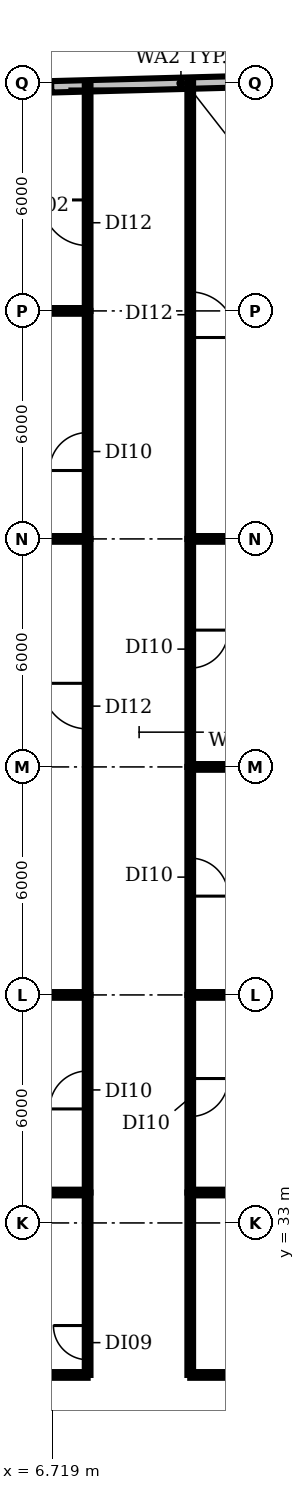
"""IFC4 building model, lengths in metres.
Left out: names, types, materials, properties, quantities, classifications, styles, units other than length and angle.
Written with IfcOpenShell. Run it as: python <this file> out.ifc"""

import sys

from ifc_helpers import new_model, si_unit, direction, frame, frame_2d, origin, place, context, subcontext, project, spatial, rectangle, extrude, element, fill, save


model = new_model("IFC4")
c1 = context("Model", 3, precision=1e-05, world=origin(), true_north=direction((0.0, 1.0)))
c2 = subcontext(c1, "Body", "Model", "MODEL_VIEW")
j1 = project(units=[si_unit("LENGTHUNIT", "METRE"), si_unit("PLANEANGLEUNIT", "RADIAN")], contexts=[c1])
p1 = place(None, origin())
s1 = spatial("IfcSite", under=j1, at=p1, CompositionType="ELEMENT")
p2 = place(p1, origin())
s2 = spatial("IfcBuilding", under=s1, at=p2, CompositionType="ELEMENT")
p3 = place(p2, frame((0.0, 0.0, 293.6)))
s3 = spatial("IfcBuildingStorey", under=s2, at=p3, CompositionType="ELEMENT", Elevation=293.6)
p4 = place(p3, frame((13.518, 63.08, 0.0), z_axis=(0.0, 0.0, 1.0), x_axis=(-0.999640403912, -0.026815347578, 0.0)))
e1 = element("IfcWall", 1, at=p4, inside=s3, PredefinedType="SOLIDWALL", context=c2, shape_type="SweptSolid", body=[
    extrude(rectangle(XDim=6.828, YDim=0.3, at=frame_2d((3.414, 0.0))), origin(), (0.0, 0.0, 1.0), 3.85),
])
p5 = place(p3, frame((-1.716, 57.0, 0.0), z_axis=(0.0, 0.0, 1.0), x_axis=(1.0, 0.0, 0.0)))
e2 = element("IfcWall", 2, at=p5, inside=s3, PredefinedType="PARTITIONING", context=c2, shape_type="SweptSolid", body=[
    extrude(rectangle(XDim=9.366, YDim=0.15, at=frame_2d((4.683, 0.0))), origin(), (0.0, 0.0, 1.0), 2.9),
])
p6 = place(p3, frame((-1.566, 51.0, 0.0), z_axis=(0.0, 0.0, 1.0), x_axis=(1.0, 0.0, 0.0)))
e3 = element("IfcWall", 3, at=p6, inside=s3, PredefinedType="PARTITIONING", context=c2, shape_type="SweptSolid", body=[
    extrude(rectangle(XDim=9.216, YDim=0.15, at=frame_2d((4.608, 0.0))), origin(), (0.0, 0.0, 1.0), 2.9),
])
p7 = place(p3, frame((-1.26, 39.0, 0.0), z_axis=(0.0, 0.0, 1.0), x_axis=(1.0, 0.0, 0.0)))
e4 = element("IfcWall", 4, at=p7, inside=s3, PredefinedType="PARTITIONING", context=c2, shape_type="SweptSolid", body=[
    extrude(rectangle(XDim=8.91, YDim=0.15, at=frame_2d((4.455, 0.0))), origin(), (0.0, 0.0, 1.0), 2.9),
])
p8 = place(p3, frame((-1.115, 33.8, 0.0), z_axis=(0.0, 0.0, 1.0), x_axis=(1.0, 0.0, 0.0)))
e5 = element("IfcWall", 5, at=p8, inside=s3, PredefinedType="PARTITIONING", context=c2, shape_type="SweptSolid", body=[
    extrude(rectangle(XDim=8.765, YDim=0.15, at=frame_2d((4.383, 0.0))), origin(), (0.0, 0.0, 1.0), 2.9),
])
p9 = place(p3, frame((3.0, 29.0, 0.0), z_axis=(0.0, 0.0, 1.0), x_axis=(1.0, 0.0, 0.0)))
e6 = element("IfcWall", 6, at=p9, inside=s3, PredefinedType="PARTITIONING", context=c2, shape_type="SweptSolid", body=[
    extrude(rectangle(XDim=4.65, YDim=0.15, at=frame_2d((2.325, 0.0))), origin(), (0.0, 0.0, 1.0), 2.9),
])
p10 = place(p3, frame((7.65, 29.0, 0.0), z_axis=(0.0, 0.0, 1.0), x_axis=(0.0, 1.0, 0.0)))
e7 = element("IfcWall", 7, at=p10, inside=s3, PredefinedType="PARTITIONING", context=c2, shape_type="SweptSolid", body=[
    extrude(rectangle(XDim=4.8, YDim=0.15, at=frame_2d((2.4, 0.0))), origin(), (0.0, 0.0, 1.0), 2.9),
])
p11 = place(p10, frame((0.4, 0.0, 0.0)))
e8 = element("IfcOpeningElement", 8, at=p11, cuts=e7, PredefinedType="OPENING", context=c2, shape_type="SweptSolid", body=[
    extrude(rectangle(XDim=0.9, YDim=2.1, at=frame_2d((0.45, 1.05))), frame((0.0, 0.085, 0.0), z_axis=(0.0, -1.0, 0.0), x_axis=(1.0, 0.0, 0.0)), (0.0, 0.0, 1.0), 0.17),
])
p12 = place(p3, frame((7.65, 33.8, 0.0), z_axis=(0.0, 0.0, 1.0), x_axis=(0.0, 1.0, 0.0)))
e9 = element("IfcWall", 9, at=p12, inside=s3, PredefinedType="PARTITIONING", context=c2, shape_type="SweptSolid", body=[
    extrude(rectangle(XDim=5.2, YDim=0.15, at=frame_2d((2.6, 0.0))), origin(), (0.0, 0.0, 1.0), 2.9),
])
p13 = place(p12, frame((2.2, 0.0, 0.0)))
e10 = element("IfcOpeningElement", 10, at=p13, cuts=e9, PredefinedType="OPENING", context=c2, shape_type="SweptSolid", body=[
    extrude(rectangle(XDim=1.0, YDim=2.1, at=frame_2d((0.5, 1.05))), frame((0.0, 0.085, 0.0), z_axis=(0.0, -1.0, 0.0), x_axis=(1.0, 0.0, 0.0)), (0.0, 0.0, 1.0), 0.17),
])
p14 = place(p3, frame((7.65, 39.0, 0.0), z_axis=(0.0, 0.0, 1.0), x_axis=(0.0, 1.0, 0.0)))
e11 = element("IfcWall", 11, at=p14, inside=s3, PredefinedType="PARTITIONING", context=c2, shape_type="SweptSolid", body=[
    extrude(rectangle(XDim=12.0, YDim=0.15, at=frame_2d((6.0, 0.0))), origin(), (0.0, 0.0, 1.0), 2.9),
])
p15 = place(p14, frame((7.0, 0.0, 0.0)))
e12 = element("IfcOpeningElement", 12, at=p15, cuts=e11, PredefinedType="OPENING", context=c2, shape_type="SweptSolid", body=[
    extrude(rectangle(XDim=1.2, YDim=2.1, at=frame_2d((0.6, 1.05))), frame((0.0, 0.085, 0.0), z_axis=(0.0, -1.0, 0.0), x_axis=(1.0, 0.0, 0.0)), (0.0, 0.0, 1.0), 0.17),
])
p16 = place(p3, frame((7.65, 51.0, 0.0), z_axis=(0.0, 0.0, 1.0), x_axis=(0.0, 1.0, 0.0)))
e13 = element("IfcWall", 13, at=p16, inside=s3, PredefinedType="PARTITIONING", context=c2, shape_type="SweptSolid", body=[
    extrude(rectangle(XDim=6.0, YDim=0.15, at=frame_2d((3.0, 0.0))), origin(), (0.0, 0.0, 1.0), 2.9),
])
p17 = place(p16, frame((1.8, 0.0, 0.0)))
e14 = element("IfcOpeningElement", 14, at=p17, cuts=e13, PredefinedType="OPENING", context=c2, shape_type="SweptSolid", body=[
    extrude(rectangle(XDim=1.0, YDim=2.1, at=frame_2d((0.5, 1.05))), frame((0.0, 0.085, 0.0), z_axis=(0.0, -1.0, 0.0), x_axis=(1.0, 0.0, 0.0)), (0.0, 0.0, 1.0), 0.17),
])
p18 = place(p3, frame((7.65, 57.0, 0.0), z_axis=(0.0, 0.0, 1.0), x_axis=(0.0, 1.0, 0.0)))
e15 = element("IfcWall", 15, at=p18, inside=s3, PredefinedType="PARTITIONING", context=c2, shape_type="SweptSolid", body=[
    extrude(rectangle(XDim=5.933, YDim=0.15, at=frame_2d((2.966, 0.0))), origin(), (0.0, 0.0, 1.0), 2.9),
])
p19 = place(p18, frame((1.72, 0.0, 0.0)))
e16 = element("IfcOpeningElement", 16, at=p19, cuts=e15, PredefinedType="OPENING", context=c2, shape_type="SweptSolid", body=[
    extrude(rectangle(XDim=1.2, YDim=2.1, at=frame_2d((0.6, 1.05))), frame((0.0, 0.085, 0.0), z_axis=(0.0, -1.0, 0.0), x_axis=(1.0, 0.0, 0.0)), (0.0, 0.0, 1.0), 0.17),
])
p20 = place(p3, frame((10.35, 29.0, 0.0), z_axis=(0.0, 0.0, 1.0), x_axis=(0.0, 1.0, 0.0)))
e17 = element("IfcWall", 17, at=p20, inside=s3, PredefinedType="PARTITIONING", context=c2, shape_type="SweptSolid", body=[
    extrude(rectangle(XDim=4.8, YDim=0.15, at=frame_2d((2.4, 0.0))), origin(), (0.0, 0.0, 1.0), 2.9),
])
p21 = place(p3, frame((10.35, 29.0, 0.0), z_axis=(0.0, 0.0, 1.0), x_axis=(1.0, 0.0, 0.0)))
e18 = element("IfcWall", 18, at=p21, inside=s3, PredefinedType="PARTITIONING", context=c2, shape_type="SweptSolid", body=[
    extrude(rectangle(XDim=4.05, YDim=0.15, at=frame_2d((2.025, 0.0))), origin(), (0.0, 0.0, 1.0), 2.9),
])
p22 = place(p3, frame((10.35, 33.8, 0.0), z_axis=(0.0, 0.0, 1.0), x_axis=(1.0, 0.0, 0.0)))
e19 = element("IfcWall", 19, at=p22, inside=s3, PredefinedType="PARTITIONING", context=c2, shape_type="SweptSolid", body=[
    extrude(rectangle(XDim=11.03, YDim=0.15, at=frame_2d((5.515, 0.0))), origin(), (0.0, 0.0, 1.0), 2.9),
])
p23 = place(p3, frame((10.35, 39.0, 0.0), z_axis=(0.0, 0.0, 1.0), x_axis=(0.0, -1.0, 0.0)))
e20 = element("IfcWall", 20, at=p23, inside=s3, PredefinedType="PARTITIONING", context=c2, shape_type="SweptSolid", body=[
    extrude(rectangle(XDim=5.2, YDim=0.15, at=frame_2d((2.6, 0.0))), origin(), (0.0, 0.0, 1.0), 2.9),
])
p24 = place(p23, frame((2.2, 0.0, 0.0)))
e21 = element("IfcOpeningElement", 21, at=p24, cuts=e20, PredefinedType="OPENING", context=c2, shape_type="SweptSolid", body=[
    extrude(rectangle(XDim=1.0, YDim=2.1, at=frame_2d((0.5, 1.05))), frame((0.0, 0.085, 0.0), z_axis=(0.0, -1.0, 0.0), x_axis=(1.0, 0.0, 0.0)), (0.0, 0.0, 1.0), 0.17),
])
p25 = place(p3, frame((10.35, 39.0, 0.0), z_axis=(0.0, 0.0, 1.0), x_axis=(1.0, 0.0, 0.0)))
e22 = element("IfcWall", 22, at=p25, inside=s3, PredefinedType="PARTITIONING", context=c2, shape_type="SweptSolid", body=[
    extrude(rectangle(XDim=14.63, YDim=0.15, at=frame_2d((7.315, 0.0))), origin(), (0.0, 0.0, 1.0), 2.9),
])
p26 = place(p3, frame((10.35, 45.0, 0.0), z_axis=(0.0, 0.0, 1.0), x_axis=(0.0, -1.0, 0.0)))
e23 = element("IfcWall", 23, at=p26, inside=s3, PredefinedType="PARTITIONING", context=c2, shape_type="SweptSolid", body=[
    extrude(rectangle(XDim=6.0, YDim=0.15, at=frame_2d((3.0, 0.0))), origin(), (0.0, 0.0, 1.0), 2.9),
])
p27 = place(p26, frame((2.4, 0.0, 0.0)))
e24 = element("IfcOpeningElement", 24, at=p27, cuts=e23, PredefinedType="OPENING", context=c2, shape_type="SweptSolid", body=[
    extrude(rectangle(XDim=1.0, YDim=2.1, at=frame_2d((0.5, 1.05))), frame((0.0, 0.085, 0.0), z_axis=(0.0, -1.0, 0.0), x_axis=(1.0, 0.0, 0.0)), (0.0, 0.0, 1.0), 0.17),
])
p28 = place(p3, frame((10.35, 45.0, 0.0), z_axis=(0.0, 0.0, 1.0), x_axis=(1.0, 0.0, 0.0)))
e25 = element("IfcWall", 25, at=p28, inside=s3, PredefinedType="PARTITIONING", context=c2, shape_type="SweptSolid", body=[
    extrude(rectangle(XDim=14.63, YDim=0.15, at=frame_2d((7.315, 0.0))), origin(), (0.0, 0.0, 1.0), 2.9),
])
p29 = place(p3, frame((10.35, 51.0, 0.0), z_axis=(0.0, 0.0, 1.0), x_axis=(0.0, -1.0, 0.0)))
e26 = element("IfcWall", 26, at=p29, inside=s3, PredefinedType="PARTITIONING", context=c2, shape_type="SweptSolid", body=[
    extrude(rectangle(XDim=6.0, YDim=0.15, at=frame_2d((3.0, 0.0))), origin(), (0.0, 0.0, 1.0), 2.9),
])
p30 = place(p29, frame((2.4, 0.0, 0.0)))
e27 = element("IfcOpeningElement", 27, at=p30, cuts=e26, PredefinedType="OPENING", context=c2, shape_type="SweptSolid", body=[
    extrude(rectangle(XDim=1.0, YDim=2.1, at=frame_2d((0.5, 1.05))), frame((0.0, 0.085, 0.0), z_axis=(0.0, -1.0, 0.0), x_axis=(1.0, 0.0, 0.0)), (0.0, 0.0, 1.0), 0.17),
])
p31 = place(p3, frame((10.35, 51.0, 0.0), z_axis=(0.0, 0.0, 1.0), x_axis=(1.0, 0.0, 0.0)))
e28 = element("IfcWall", 28, at=p31, inside=s3, PredefinedType="PARTITIONING", context=c2, shape_type="SweptSolid", body=[
    extrude(rectangle(XDim=14.63, YDim=0.15, at=frame_2d((7.315, 0.0))), origin(), (0.0, 0.0, 1.0), 2.9),
])
p32 = place(p3, frame((10.35, 63.005, 0.0), z_axis=(0.0, 0.0, 1.0), x_axis=(0.0, -1.0, 0.0)))
e29 = element("IfcWall", 29, at=p32, inside=s3, PredefinedType="PARTITIONING", context=c2, shape_type="SweptSolid", body=[
    extrude(rectangle(XDim=12.005, YDim=0.15, at=frame_2d((6.002, 0.0))), origin(), (0.0, 0.0, 1.0), 2.9),
])
p33 = place(p32, frame((5.505, 0.0, 0.0)))
e30 = element("IfcOpeningElement", 30, at=p33, cuts=e29, PredefinedType="OPENING", context=c2, shape_type="SweptSolid", body=[
    extrude(rectangle(XDim=1.2, YDim=2.1, at=frame_2d((0.6, 1.05))), frame((0.0, 0.085, 0.0), z_axis=(0.0, -1.0, 0.0), x_axis=(1.0, 0.0, 0.0)), (0.0, 0.0, 1.0), 0.17),
])
p34 = place(p11, origin())
e31 = element("IfcDoor", 31, at=p34, inside=s3, OperationType="SINGLE_SWING_RIGHT", PredefinedType="DOOR", context=c2, shape_type="SweptSolid", body=[
    extrude(rectangle(XDim=0.9, YDim=2.1, at=frame_2d((0.45, 1.05))), frame((0.0, 0.025, 0.0), z_axis=(0.0, -1.0, 0.0), x_axis=(1.0, 0.0, 0.0)), (0.0, 0.0, 1.0), 0.05),
])
fill(e8, e31)
p35 = place(p13, origin())
e32 = element("IfcDoor", 32, at=p35, inside=s3, OperationType="SINGLE_SWING_LEFT", PredefinedType="DOOR", context=c2, shape_type="SweptSolid", body=[
    extrude(rectangle(XDim=1.0, YDim=2.1, at=frame_2d((0.5, 1.05))), frame((0.0, 0.025, 0.0), z_axis=(0.0, -1.0, 0.0), x_axis=(1.0, 0.0, 0.0)), (0.0, 0.0, 1.0), 0.05),
])
fill(e10, e32)
p36 = place(p15, origin())
e33 = element("IfcDoor", 33, at=p36, inside=s3, OperationType="SINGLE_SWING_RIGHT", PredefinedType="DOOR", context=c2, shape_type="SweptSolid", body=[
    extrude(rectangle(XDim=1.2, YDim=2.1, at=frame_2d((0.6, 1.05))), frame((0.0, 0.025, 0.0), z_axis=(0.0, -1.0, 0.0), x_axis=(1.0, 0.0, 0.0)), (0.0, 0.0, 1.0), 0.05),
])
fill(e12, e33)
p37 = place(p17, origin())
e34 = element("IfcDoor", 34, at=p37, inside=s3, OperationType="SINGLE_SWING_LEFT", PredefinedType="DOOR", context=c2, shape_type="SweptSolid", body=[
    extrude(rectangle(XDim=1.0, YDim=2.1, at=frame_2d((0.5, 1.05))), frame((0.0, 0.025, 0.0), z_axis=(0.0, -1.0, 0.0), x_axis=(1.0, 0.0, 0.0)), (0.0, 0.0, 1.0), 0.05),
])
fill(e14, e34)
p38 = place(p19, origin())
e35 = element("IfcDoor", 35, at=p38, inside=s3, OperationType="SINGLE_SWING_RIGHT", PredefinedType="DOOR", context=c2, shape_type="SweptSolid", body=[
    extrude(rectangle(XDim=1.2, YDim=2.1, at=frame_2d((0.6, 1.05))), frame((0.0, 0.025, 0.0), z_axis=(0.0, -1.0, 0.0), x_axis=(1.0, 0.0, 0.0)), (0.0, 0.0, 1.0), 0.05),
])
fill(e16, e35)
p39 = place(p24, origin())
e36 = element("IfcDoor", 36, at=p39, inside=s3, OperationType="SINGLE_SWING_LEFT", PredefinedType="DOOR", context=c2, shape_type="SweptSolid", body=[
    extrude(rectangle(XDim=1.0, YDim=2.1, at=frame_2d((0.5, 1.05))), frame((0.0, 0.025, 0.0), z_axis=(0.0, -1.0, 0.0), x_axis=(1.0, 0.0, 0.0)), (0.0, 0.0, 1.0), 0.05),
])
fill(e21, e36)
p40 = place(p27, origin())
e37 = element("IfcDoor", 37, at=p40, inside=s3, OperationType="SINGLE_SWING_RIGHT", PredefinedType="DOOR", context=c2, shape_type="SweptSolid", body=[
    extrude(rectangle(XDim=1.0, YDim=2.1, at=frame_2d((0.5, 1.05))), frame((0.0, 0.025, 0.0), z_axis=(0.0, -1.0, 0.0), x_axis=(1.0, 0.0, 0.0)), (0.0, 0.0, 1.0), 0.05),
])
fill(e24, e37)
p41 = place(p30, origin())
e38 = element("IfcDoor", 38, at=p41, inside=s3, OperationType="SINGLE_SWING_LEFT", PredefinedType="DOOR", context=c2, shape_type="SweptSolid", body=[
    extrude(rectangle(XDim=1.0, YDim=2.1, at=frame_2d((0.5, 1.05))), frame((0.0, 0.025, 0.0), z_axis=(0.0, -1.0, 0.0), x_axis=(1.0, 0.0, 0.0)), (0.0, 0.0, 1.0), 0.05),
])
fill(e27, e38)
p42 = place(p33, origin())
e39 = element("IfcDoor", 39, at=p42, inside=s3, OperationType="SINGLE_SWING_RIGHT", PredefinedType="DOOR", context=c2, shape_type="SweptSolid", body=[
    extrude(rectangle(XDim=1.2, YDim=2.1, at=frame_2d((0.6, 1.05))), frame((0.0, 0.025, 0.0), z_axis=(0.0, -1.0, 0.0), x_axis=(1.0, 0.0, 0.0)), (0.0, 0.0, 1.0), 0.05),
])
fill(e30, e39)
save(model, sys.argv[1])
